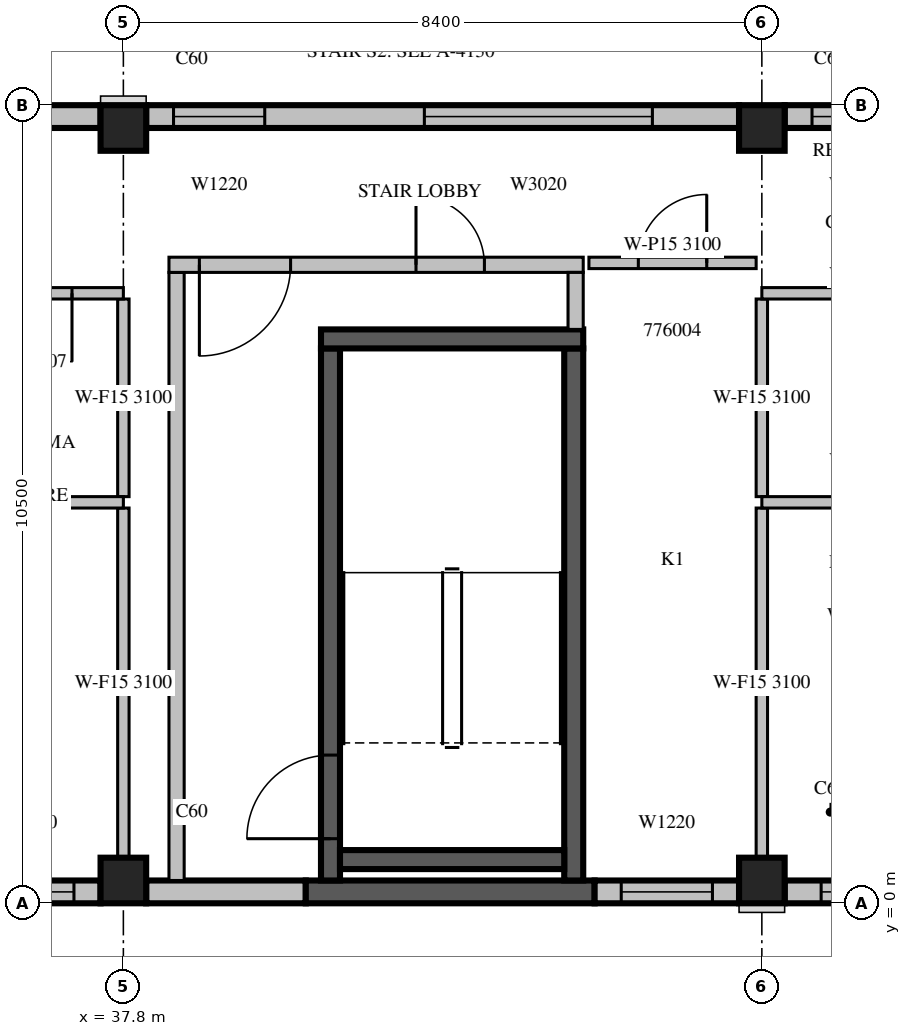
"""IFC4 building model, lengths in metres.
Left out: names, types, materials, properties, quantities, classifications, styles, units other than length and angle.
Written with IfcOpenShell. Run it as: python <this file> out.ifc"""

import sys

from ifc_helpers import new_model, si_unit, direction, frame, frame_2d, origin, origin_2d, place, context, subcontext, project, spatial, rectangle, extrude, source, transform, mapped, element, fill, save


model = new_model("IFC4")
c1 = context("Model", 3, precision=1e-05, world=origin(), true_north=direction((0.0, 1.0)))
c2 = subcontext(c1, "Body", "Model", "MODEL_VIEW")
j1 = project(units=[si_unit("LENGTHUNIT", "METRE"), si_unit("PLANEANGLEUNIT", "RADIAN")], contexts=[c1])
p1 = place(None, origin())
s1 = spatial("IfcSite", under=j1, at=p1, CompositionType="ELEMENT")
p2 = place(p1, origin())
s2 = spatial("IfcBuilding", under=s1, at=p2, CompositionType="ELEMENT")
p3 = place(p2, frame((0.0, 0.0, 326.5)))
s3 = spatial("IfcBuildingStorey", under=s2, at=p3, CompositionType="ELEMENT", Elevation=326.5)
m1 = source(origin(), c2, "Body", "SweptSolid", [
    extrude(rectangle(XDim=0.6, YDim=0.6, at=origin_2d()), origin(), (0.0, 0.0, 1.0), 3.5),
])
for number, where, z_axis, x_axis in (
    (1, (37.8, 0.3, 0.0), (0.0, 0.0, 1.0), (1.0, 0.0, 0.0)),
    (2, (46.2, 0.3, 0.0), (0.0, 0.0, 1.0), (1.0, 0.0, 0.0)),
    (3, (37.8, 10.2, 0.0), (0.0, 0.0, 1.0), (1.0, 0.0, 0.0)),
    (4, (46.2, 10.2, 0.0), (0.0, 0.0, 1.0), (1.0, 0.0, 0.0)),
):
    element("IfcColumn", number, at=place(p3, frame(where, z_axis=z_axis, x_axis=x_axis)), inside=s3, PredefinedType="COLUMN", context=c2, shape_type="MappedRepresentation", body=[
        mapped(m1, transform((0.0, 0.0, 0.0), scale=1.0)),
    ])
p4 = place(p3, frame((35.6, 0.15, 0.0), z_axis=(0.0, 0.0, 1.0), x_axis=(1.0, 0.0, 0.0)))
e5 = element("IfcWall", 5, at=p4, inside=s3, PredefinedType="STANDARD", context=c2, shape_type="SweptSolid", body=[
    extrude(rectangle(XDim=1.9, YDim=0.3, at=frame_2d((0.95, 0.0))), origin(), (0.0, 0.0, 1.0), 3.1),
])
m2 = source(origin(), c2, "Body", "SweptSolid", [
    extrude(rectangle(XDim=1.2, YDim=2.0, at=frame_2d((0.6, 1.0))), frame((0.0, 0.16, 0.0), z_axis=(0.0, -1.0, 0.0), x_axis=(1.0, 0.0, 0.0)), (0.0, 0.0, 1.0), 0.32),
])
p5 = place(p4, frame((0.35, 0.0, 0.6)))
e6 = element("IfcOpeningElement", 6, at=p5, cuts=e5, PredefinedType="OPENING", context=c2, shape_type="MappedRepresentation", body=[
    mapped(m2, transform((0.0, 0.0, 0.0), scale=1.0)),
])
m3 = source(origin(), c2, "Body", "SweptSolid", [
    extrude(rectangle(XDim=2.1, YDim=0.3, at=frame_2d((1.05, 0.0))), origin(), (0.0, 0.0, 1.0), 3.1),
])
p6 = place(p3, frame((38.1, 0.15, 0.0), z_axis=(0.0, 0.0, 1.0), x_axis=(1.0, 0.0, 0.0)))
e7 = element("IfcWall", 7, at=p6, inside=s3, PredefinedType="STANDARD", context=c2, shape_type="MappedRepresentation", body=[
    mapped(m3, transform((0.0, 0.0, 0.0), scale=1.0)),
])
m4 = source(origin(), c2, "Body", "SweptSolid", [
    extrude(rectangle(XDim=3.8, YDim=0.3, at=frame_2d((1.9, 0.0))), origin(), (0.0, 0.0, 1.0), 3.1),
])
p7 = place(p3, frame((40.2, 0.15, 0.0), z_axis=(0.0, 0.0, 1.0), x_axis=(1.0, 0.0, 0.0)))
e8 = element("IfcWall", 8, at=p7, inside=s3, PredefinedType="SOLIDWALL", context=c2, shape_type="MappedRepresentation", body=[
    mapped(m4, transform((0.0, 0.0, 0.0), scale=1.0)),
])
m5 = source(origin(), c2, "Body", "SweptSolid", [
    extrude(rectangle(XDim=1.9, YDim=0.3, at=frame_2d((0.95, 0.0))), origin(), (0.0, 0.0, 1.0), 3.1),
])
p8 = place(p3, frame((44.0, 0.15, 0.0), z_axis=(0.0, 0.0, 1.0), x_axis=(1.0, 0.0, 0.0)))
e9 = element("IfcWall", 9, at=p8, inside=s3, PredefinedType="STANDARD", context=c2, shape_type="MappedRepresentation", body=[
    mapped(m5, transform((0.0, 0.0, 0.0), scale=1.0)),
])
p9 = place(p8, frame((0.35, 0.0, 0.6)))
e10 = element("IfcOpeningElement", 10, at=p9, cuts=e9, PredefinedType="OPENING", context=c2, shape_type="MappedRepresentation", body=[
    mapped(m2, transform((0.0, 0.0, 0.0), scale=1.0)),
])
p10 = place(p3, frame((46.5, 0.15, 0.0), z_axis=(0.0, 0.0, 1.0), x_axis=(1.0, 0.0, 0.0)))
e11 = element("IfcWall", 11, at=p10, inside=s3, PredefinedType="STANDARD", context=c2, shape_type="SweptSolid", body=[
    extrude(rectangle(XDim=3.06, YDim=0.3, at=frame_2d((1.53, 0.0))), origin(), (0.0, 0.0, 1.0), 3.1),
])
m6 = source(origin(), c2, "Body", "SweptSolid", [
    extrude(rectangle(XDim=1.8, YDim=2.0, at=frame_2d((0.9, 1.0))), frame((0.0, 0.16, 0.0), z_axis=(0.0, -1.0, 0.0), x_axis=(1.0, 0.0, 0.0)), (0.0, 0.0, 1.0), 0.32),
])
p11 = place(p10, frame((0.48, 0.0, 0.6)))
e12 = element("IfcOpeningElement", 12, at=p11, cuts=e11, PredefinedType="OPENING", context=c2, shape_type="MappedRepresentation", body=[
    mapped(m6, transform((0.0, 0.0, 0.0), scale=1.0)),
])
m7 = source(origin(), c2, "Body", "SweptSolid", [
    extrude(rectangle(XDim=3.06, YDim=0.3, at=frame_2d((1.53, 0.0))), origin(), (0.0, 0.0, 1.0), 3.1),
])
p12 = place(p3, frame((49.56, 10.35, 0.0), z_axis=(0.0, 0.0, 1.0), x_axis=(-1.0, 0.0, 0.0)))
e13 = element("IfcWall", 13, at=p12, inside=s3, PredefinedType="STANDARD", context=c2, shape_type="MappedRepresentation", body=[
    mapped(m7, transform((0.0, 0.0, 0.0), scale=1.0)),
])
p13 = place(p12, frame((1.5, 0.0, 0.6)))
e14 = element("IfcOpeningElement", 14, at=p13, cuts=e13, PredefinedType="OPENING", context=c2, shape_type="MappedRepresentation", body=[
    mapped(m2, transform((0.0, 0.0, 0.0), scale=1.0)),
])
m8 = source(origin(), c2, "Body", "SweptSolid", [
    extrude(rectangle(XDim=7.8, YDim=0.3, at=frame_2d((3.9, 0.0))), origin(), (0.0, 0.0, 1.0), 3.1),
])
p14 = place(p3, frame((45.9, 10.35, 0.0), z_axis=(0.0, 0.0, 1.0), x_axis=(-1.0, 0.0, 0.0)))
e15 = element("IfcWall", 15, at=p14, inside=s3, PredefinedType="STANDARD", context=c2, shape_type="MappedRepresentation", body=[
    mapped(m8, transform((0.0, 0.0, 0.0), scale=1.0)),
])
m9 = source(origin(), c2, "Body", "SweptSolid", [
    extrude(rectangle(XDim=3.0, YDim=2.0, at=frame_2d((1.5, 1.0))), frame((0.0, 0.16, 0.0), z_axis=(0.0, -1.0, 0.0), x_axis=(1.0, 0.0, 0.0)), (0.0, 0.0, 1.0), 0.32),
])
p15 = place(p14, frame((1.14, 0.0, 0.6)))
e16 = element("IfcOpeningElement", 16, at=p15, cuts=e15, PredefinedType="OPENING", context=c2, shape_type="MappedRepresentation", body=[
    mapped(m9, transform((0.0, 0.0, 0.0), scale=1.0)),
])
p16 = place(p14, frame((6.24, 0.0, 0.6)))
e17 = element("IfcOpeningElement", 17, at=p16, cuts=e15, PredefinedType="OPENING", context=c2, shape_type="MappedRepresentation", body=[
    mapped(m2, transform((0.0, 0.0, 0.0), scale=1.0)),
])
p17 = place(p3, frame((37.5, 10.35, 0.0), z_axis=(0.0, 0.0, 1.0), x_axis=(-1.0, 0.0, 0.0)))
e18 = element("IfcWall", 18, at=p17, inside=s3, PredefinedType="STANDARD", context=c2, shape_type="MappedRepresentation", body=[
    mapped(m8, transform((0.0, 0.0, 0.0), scale=1.0)),
])
p18 = place(p17, frame((1.14, 0.0, 0.6)))
e19 = element("IfcOpeningElement", 19, at=p18, cuts=e18, PredefinedType="OPENING", context=c2, shape_type="MappedRepresentation", body=[
    mapped(m9, transform((0.0, 0.0, 0.0), scale=1.0)),
])
p19 = place(p17, frame((6.24, 0.0, 0.6)))
e20 = element("IfcOpeningElement", 20, at=p19, cuts=e18, PredefinedType="OPENING", context=c2, shape_type="MappedRepresentation", body=[
    mapped(m2, transform((0.0, 0.0, 0.0), scale=1.0)),
])
m10 = source(origin(), c2, "Body", "SweptSolid", [
    extrude(rectangle(XDim=7.0, YDim=0.25, at=frame_2d((3.5, 0.0))), origin(), (0.0, 0.0, 1.0), 3.1),
])
p20 = place(p3, frame((40.525, 0.3, 0.0), z_axis=(0.0, 0.0, 1.0), x_axis=(0.0, 1.0, 0.0)))
e21 = element("IfcWall", 21, at=p20, inside=s3, PredefinedType="SOLIDWALL", context=c2, shape_type="MappedRepresentation", body=[
    mapped(m10, transform((0.0, 0.0, 0.0), scale=1.0)),
])
m11 = source(origin(), c2, "Body", "SweptSolid", [
    extrude(rectangle(XDim=1.1, YDim=2.1, at=frame_2d((0.55, 1.05))), frame((0.0, 0.135, 0.0), z_axis=(0.0, -1.0, 0.0), x_axis=(1.0, 0.0, 0.0)), (0.0, 0.0, 1.0), 0.27),
])
p21 = place(p20, frame((0.55, 0.0, 0.0)))
e22 = element("IfcOpeningElement", 22, at=p21, cuts=e21, PredefinedType="OPENING", context=c2, shape_type="MappedRepresentation", body=[
    mapped(m11, transform((0.0, 0.0, 0.0), scale=1.0)),
])
p22 = place(p3, frame((43.725, 0.3, 0.0), z_axis=(0.0, 0.0, 1.0), x_axis=(0.0, 1.0, 0.0)))
e23 = element("IfcWall", 23, at=p22, inside=s3, PredefinedType="SOLIDWALL", context=c2, shape_type="MappedRepresentation", body=[
    mapped(m10, transform((0.0, 0.0, 0.0), scale=1.0)),
])
m12 = source(origin(), c2, "Body", "SweptSolid", [
    extrude(rectangle(XDim=3.45, YDim=0.25, at=frame_2d((1.725, 0.0))), origin(), (0.0, 0.0, 1.0), 3.1),
])
p23 = place(p3, frame((40.4, 7.425, 0.0), z_axis=(0.0, 0.0, 1.0), x_axis=(1.0, 0.0, 0.0)))
e24 = element("IfcWall", 24, at=p23, inside=s3, PredefinedType="SOLIDWALL", context=c2, shape_type="MappedRepresentation", body=[
    mapped(m12, transform((0.0, 0.0, 0.0), scale=1.0)),
])
m13 = source(origin(), c2, "Body", "SweptSolid", [
    extrude(rectangle(XDim=2.95, YDim=0.25, at=frame_2d((1.475, 0.0))), origin(), (0.0, 0.0, 1.0), 3.1),
])
p24 = place(p3, frame((40.65, 0.575, 0.0), z_axis=(0.0, 0.0, 1.0), x_axis=(1.0, 0.0, 0.0)))
e25 = element("IfcWall", 25, at=p24, inside=s3, PredefinedType="SOLIDWALL", context=c2, shape_type="MappedRepresentation", body=[
    mapped(m13, transform((0.0, 0.0, 0.0), scale=1.0)),
])
m14 = source(origin(), c2, "Body", "SweptSolid", [
    extrude(rectangle(XDim=8.0, YDim=0.2, at=frame_2d((4.0, 0.0))), origin(), (0.0, 0.0, 1.0), 3.1),
])
p25 = place(p3, frame((38.5, 0.3, 0.0), z_axis=(0.0, 0.0, 1.0), x_axis=(0.0, 1.0, 0.0)))
e26 = element("IfcWall", 26, at=p25, inside=s3, PredefinedType="PARTITIONING", context=c2, shape_type="MappedRepresentation", body=[
    mapped(m14, transform((0.0, 0.0, 0.0), scale=1.0)),
])
m15 = source(origin(), c2, "Body", "SweptSolid", [
    extrude(rectangle(XDim=5.45, YDim=0.2, at=frame_2d((2.725, 0.0))), origin(), (0.0, 0.0, 1.0), 3.1),
])
p26 = place(p3, frame((38.4, 8.4, 0.0), z_axis=(0.0, 0.0, 1.0), x_axis=(1.0, 0.0, 0.0)))
e27 = element("IfcWall", 27, at=p26, inside=s3, PredefinedType="PARTITIONING", context=c2, shape_type="MappedRepresentation", body=[
    mapped(m15, transform((0.0, 0.0, 0.0), scale=1.0)),
])
m16 = source(origin(), c2, "Body", "SweptSolid", [
    extrude(rectangle(XDim=1.2, YDim=2.1, at=frame_2d((0.6, 1.05))), frame((0.0, 0.11, 0.0), z_axis=(0.0, -1.0, 0.0), x_axis=(1.0, 0.0, 0.0)), (0.0, 0.0, 1.0), 0.22),
])
p27 = place(p26, frame((0.4, 0.0, 0.0)))
e28 = element("IfcOpeningElement", 28, at=p27, cuts=e27, PredefinedType="OPENING", context=c2, shape_type="MappedRepresentation", body=[
    mapped(m16, transform((0.0, 0.0, 0.0), scale=1.0)),
])
m17 = source(origin(), c2, "Body", "SweptSolid", [
    extrude(rectangle(XDim=0.9, YDim=2.1, at=frame_2d((0.45, 1.05))), frame((0.0, 0.11, 0.0), z_axis=(0.0, -1.0, 0.0), x_axis=(1.0, 0.0, 0.0)), (0.0, 0.0, 1.0), 0.22),
])
p28 = place(p26, frame((3.25, 0.0, 0.0)))
e29 = element("IfcOpeningElement", 29, at=p28, cuts=e27, PredefinedType="OPENING", context=c2, shape_type="MappedRepresentation", body=[
    mapped(m17, transform((0.0, 0.0, 0.0), scale=1.0)),
])
m18 = source(origin(), c2, "Body", "SweptSolid", [
    extrude(rectangle(XDim=0.75, YDim=0.2, at=frame_2d((0.375, 0.0))), origin(), (0.0, 0.0, 1.0), 3.1),
])
p29 = place(p3, frame((43.75, 7.55, 0.0), z_axis=(0.0, 0.0, 1.0), x_axis=(0.0, 1.0, 0.0)))
e30 = element("IfcWall", 30, at=p29, inside=s3, PredefinedType="PARTITIONING", context=c2, shape_type="MappedRepresentation", body=[
    mapped(m18, transform((0.0, 0.0, 0.0), scale=1.0)),
])
m19 = source(origin(), c2, "Body", "SweptSolid", [
    extrude(rectangle(XDim=2.2, YDim=0.15, at=frame_2d((1.1, 0.0))), origin(), (0.0, 0.0, 1.0), 3.1),
])
p30 = place(p3, frame((46.125, 8.425, 0.0), z_axis=(0.0, 0.0, 1.0), x_axis=(-1.0, 0.0, 0.0)))
e31 = element("IfcWall", 31, at=p30, inside=s3, PredefinedType="PARTITIONING", context=c2, shape_type="MappedRepresentation", body=[
    mapped(m19, transform((0.0, 0.0, 0.0), scale=1.0)),
])
m20 = source(origin(), c2, "Body", "SweptSolid", [
    extrude(rectangle(XDim=0.9, YDim=2.1, at=frame_2d((0.45, 1.05))), frame((0.0, 0.085, 0.0), z_axis=(0.0, -1.0, 0.0), x_axis=(1.0, 0.0, 0.0)), (0.0, 0.0, 1.0), 0.17),
])
p31 = place(p30, frame((0.65, 0.0, 0.0)))
e32 = element("IfcOpeningElement", 32, at=p31, cuts=e31, PredefinedType="OPENING", context=c2, shape_type="MappedRepresentation", body=[
    mapped(m20, transform((0.0, 0.0, 0.0), scale=1.0)),
])
p32 = place(p3, frame((37.8, 0.599, 0.0), z_axis=(0.0, 0.0, 1.0), x_axis=(0.0, 1.0, 0.0)))
e33 = element("IfcWall", 33, at=p32, inside=s3, PredefinedType="PARTITIONING", context=c2, shape_type="SweptSolid", body=[
    extrude(rectangle(XDim=4.601, YDim=0.15, at=frame_2d((2.3, 0.0))), origin(), (0.0, 0.0, 1.0), 3.1),
])
m21 = source(origin(), c2, "Body", "SweptSolid", [
    extrude(rectangle(XDim=2.6, YDim=0.15, at=frame_2d((1.3, 0.0))), origin(), (0.0, 0.0, 1.0), 3.1),
])
p33 = place(p3, frame((37.8, 5.35, 0.0), z_axis=(0.0, 0.0, 1.0), x_axis=(0.0, 1.0, 0.0)))
e34 = element("IfcWall", 34, at=p33, inside=s3, PredefinedType="PARTITIONING", context=c2, shape_type="MappedRepresentation", body=[
    mapped(m21, transform((0.0, 0.0, 0.0), scale=1.0)),
])
m22 = source(origin(), c2, "Body", "SweptSolid", [
    extrude(rectangle(XDim=8.4, YDim=0.15, at=frame_2d((4.2, 0.0))), origin(), (0.0, 0.0, 1.0), 3.1),
])
p34 = place(p3, frame((37.8, 5.275, 0.0), z_axis=(0.0, 0.0, 1.0), x_axis=(-1.0, 0.0, 0.0)))
e35 = element("IfcWall", 35, at=p34, inside=s3, PredefinedType="PARTITIONING", context=c2, shape_type="MappedRepresentation", body=[
    mapped(m22, transform((0.0, 0.0, 0.0), scale=1.0)),
])
m23 = source(origin(), c2, "Body", "SweptSolid", [
    extrude(rectangle(XDim=1.2, YDim=2.1, at=frame_2d((0.6, 1.05))), frame((0.0, 0.085, 0.0), z_axis=(0.0, -1.0, 0.0), x_axis=(1.0, 0.0, 0.0)), (0.0, 0.0, 1.0), 0.17),
])
p35 = place(p34, frame((4.676, 0.0, 0.0)))
e36 = element("IfcOpeningElement", 36, at=p35, cuts=e35, PredefinedType="OPENING", context=c2, shape_type="MappedRepresentation", body=[
    mapped(m23, transform((0.0, 0.0, 0.0), scale=1.0)),
])
m24 = source(origin(), c2, "Body", "SweptSolid", [
    extrude(rectangle(XDim=4.601, YDim=0.15, at=frame_2d((2.3, 0.0))), origin(), (0.0, 0.0, 1.0), 3.1),
])
p36 = place(p3, frame((46.2, 0.599, 0.0), z_axis=(0.0, 0.0, 1.0), x_axis=(0.0, 1.0, 0.0)))
e37 = element("IfcWall", 37, at=p36, inside=s3, PredefinedType="PARTITIONING", context=c2, shape_type="MappedRepresentation", body=[
    mapped(m24, transform((0.0, 0.0, 0.0), scale=1.0)),
])
p37 = place(p3, frame((46.2, 5.35, 0.0), z_axis=(0.0, 0.0, 1.0), x_axis=(0.0, 1.0, 0.0)))
e38 = element("IfcWall", 38, at=p37, inside=s3, PredefinedType="PARTITIONING", context=c2, shape_type="MappedRepresentation", body=[
    mapped(m21, transform((0.0, 0.0, 0.0), scale=1.0)),
])
m25 = source(origin(), c2, "Body", "SweptSolid", [
    extrude(rectangle(XDim=3.06, YDim=0.15, at=frame_2d((1.53, 0.0))), origin(), (0.0, 0.0, 1.0), 3.1),
])
p38 = place(p3, frame((49.26, 5.275, 0.0), z_axis=(0.0, 0.0, 1.0), x_axis=(-1.0, 0.0, 0.0)))
e39 = element("IfcWall", 39, at=p38, inside=s3, PredefinedType="PARTITIONING", context=c2, shape_type="MappedRepresentation", body=[
    mapped(m25, transform((0.0, 0.0, 0.0), scale=1.0)),
])
p39 = place(p3, frame((37.8, 8.025, 0.0), z_axis=(0.0, 0.0, 1.0), x_axis=(-1.0, 0.0, 0.0)))
e40 = element("IfcWall", 40, at=p39, inside=s3, PredefinedType="PARTITIONING", context=c2, shape_type="MappedRepresentation", body=[
    mapped(m22, transform((0.0, 0.0, 0.0), scale=1.0)),
])
p40 = place(p39, frame((4.726, 0.0, 0.0)))
e41 = element("IfcOpeningElement", 41, at=p40, cuts=e40, PredefinedType="OPENING", context=c2, shape_type="MappedRepresentation", body=[
    mapped(m23, transform((0.0, 0.0, 0.0), scale=1.0)),
])
p41 = place(p39, frame((0.676, 0.0, 0.0)))
e42 = element("IfcOpeningElement", 42, at=p41, cuts=e40, PredefinedType="OPENING", context=c2, shape_type="MappedRepresentation", body=[
    mapped(m20, transform((0.0, 0.0, 0.0), scale=1.0)),
])
p42 = place(p3, frame((49.26, 8.025, 0.0), z_axis=(0.0, 0.0, 1.0), x_axis=(-1.0, 0.0, 0.0)))
e43 = element("IfcWall", 43, at=p42, inside=s3, PredefinedType="PARTITIONING", context=c2, shape_type="MappedRepresentation", body=[
    mapped(m25, transform((0.0, 0.0, 0.0), scale=1.0)),
])
m26 = source(origin(), c2, "Body", "SweptSolid", [
    extrude(rectangle(XDim=1.0, YDim=2.1, at=frame_2d((0.5, 1.05))), frame((0.0, 0.085, 0.0), z_axis=(0.0, -1.0, 0.0), x_axis=(1.0, 0.0, 0.0)), (0.0, 0.0, 1.0), 0.17),
])
p43 = place(p42, frame((0.993, 0.0, 0.0)))
e44 = element("IfcOpeningElement", 44, at=p43, cuts=e43, PredefinedType="OPENING", context=c2, shape_type="MappedRepresentation", body=[
    mapped(m26, transform((0.0, 0.0, 0.0), scale=1.0)),
])
m27 = source(origin(), c2, "Body", "SweptSolid", [
    extrude(rectangle(XDim=1.2, YDim=2.0, at=frame_2d((0.6, 1.0))), frame((0.0, 0.03, 0.0), z_axis=(0.0, -1.0, 0.0), x_axis=(1.0, 0.0, 0.0)), (0.0, 0.0, 1.0), 0.06),
])
p44 = place(p5, origin())
e45 = element("IfcWindow", 45, at=p44, inside=s3, PartitioningType="SINGLE_PANEL", PredefinedType="WINDOW", context=c2, shape_type="MappedRepresentation", body=[
    mapped(m27, transform((0.0, 0.0, 0.0), scale=1.0)),
])
fill(e6, e45)
p45 = place(p9, origin())
e46 = element("IfcWindow", 46, at=p45, inside=s3, PartitioningType="SINGLE_PANEL", PredefinedType="WINDOW", context=c2, shape_type="MappedRepresentation", body=[
    mapped(m27, transform((0.0, 0.0, 0.0), scale=1.0)),
])
fill(e10, e46)
m28 = source(origin(), c2, "Body", "SweptSolid", [
    extrude(rectangle(XDim=1.8, YDim=2.0, at=frame_2d((0.9, 1.0))), frame((0.0, 0.03, 0.0), z_axis=(0.0, -1.0, 0.0), x_axis=(1.0, 0.0, 0.0)), (0.0, 0.0, 1.0), 0.06),
])
p46 = place(p11, origin())
e47 = element("IfcWindow", 47, at=p46, inside=s3, PartitioningType="SINGLE_PANEL", PredefinedType="WINDOW", context=c2, shape_type="MappedRepresentation", body=[
    mapped(m28, transform((0.0, 0.0, 0.0), scale=1.0)),
])
fill(e12, e47)
p47 = place(p13, origin())
e48 = element("IfcWindow", 48, at=p47, inside=s3, PartitioningType="SINGLE_PANEL", PredefinedType="WINDOW", context=c2, shape_type="MappedRepresentation", body=[
    mapped(m27, transform((0.0, 0.0, 0.0), scale=1.0)),
])
fill(e14, e48)
m29 = source(origin(), c2, "Body", "SweptSolid", [
    extrude(rectangle(XDim=3.0, YDim=2.0, at=frame_2d((1.5, 1.0))), frame((0.0, 0.03, 0.0), z_axis=(0.0, -1.0, 0.0), x_axis=(1.0, 0.0, 0.0)), (0.0, 0.0, 1.0), 0.06),
])
p48 = place(p15, origin())
e49 = element("IfcWindow", 49, at=p48, inside=s3, PartitioningType="SINGLE_PANEL", PredefinedType="WINDOW", context=c2, shape_type="MappedRepresentation", body=[
    mapped(m29, transform((0.0, 0.0, 0.0), scale=1.0)),
])
fill(e16, e49)
p49 = place(p16, origin())
e50 = element("IfcWindow", 50, at=p49, inside=s3, PartitioningType="SINGLE_PANEL", PredefinedType="WINDOW", context=c2, shape_type="MappedRepresentation", body=[
    mapped(m27, transform((0.0, 0.0, 0.0), scale=1.0)),
])
fill(e17, e50)
m30 = source(origin(), c2, "Body", "SweptSolid", [
    extrude(rectangle(XDim=1.1, YDim=2.1, at=frame_2d((0.55, 1.05))), frame((0.0, 0.025, 0.0), z_axis=(0.0, -1.0, 0.0), x_axis=(1.0, 0.0, 0.0)), (0.0, 0.0, 1.0), 0.05),
])
p50 = place(p21, origin())
e51 = element("IfcDoor", 51, at=p50, inside=s3, OperationType="SINGLE_SWING_LEFT", PredefinedType="DOOR", context=c2, shape_type="MappedRepresentation", body=[
    mapped(m30, transform((0.0, 0.0, 0.0), scale=1.0)),
])
fill(e22, e51)
m31 = source(origin(), c2, "Body", "SweptSolid", [
    extrude(rectangle(XDim=1.2, YDim=2.1, at=frame_2d((0.6, 1.05))), frame((0.0, 0.025, 0.0), z_axis=(0.0, -1.0, 0.0), x_axis=(1.0, 0.0, 0.0)), (0.0, 0.0, 1.0), 0.05),
])
p51 = place(p27, origin())
e52 = element("IfcDoor", 52, at=p51, inside=s3, OperationType="SINGLE_SWING_RIGHT", PredefinedType="DOOR", context=c2, shape_type="MappedRepresentation", body=[
    mapped(m31, transform((0.0, 0.0, 0.0), scale=1.0)),
])
fill(e28, e52)
m32 = source(origin(), c2, "Body", "SweptSolid", [
    extrude(rectangle(XDim=0.9, YDim=2.1, at=frame_2d((0.45, 1.05))), frame((0.0, 0.025, 0.0), z_axis=(0.0, -1.0, 0.0), x_axis=(1.0, 0.0, 0.0)), (0.0, 0.0, 1.0), 0.05),
])
p52 = place(p28, origin())
e53 = element("IfcDoor", 53, at=p52, inside=s3, OperationType="SINGLE_SWING_LEFT", PredefinedType="DOOR", context=c2, shape_type="MappedRepresentation", body=[
    mapped(m32, transform((0.0, 0.0, 0.0), scale=1.0)),
])
fill(e29, e53)
p53 = place(p31, origin())
e54 = element("IfcDoor", 54, at=p53, inside=s3, OperationType="SINGLE_SWING_RIGHT", PredefinedType="DOOR", context=c2, shape_type="MappedRepresentation", body=[
    mapped(m32, transform((0.0, 0.0, 0.0), scale=1.0)),
])
fill(e32, e54)
p54 = place(p41, origin())
e55 = element("IfcDoor", 55, at=p54, inside=s3, OperationType="SINGLE_SWING_LEFT", PredefinedType="DOOR", context=c2, shape_type="MappedRepresentation", body=[
    mapped(m32, transform((0.0, 0.0, 0.0), scale=1.0)),
])
fill(e42, e55)
save(model, sys.argv[1])
